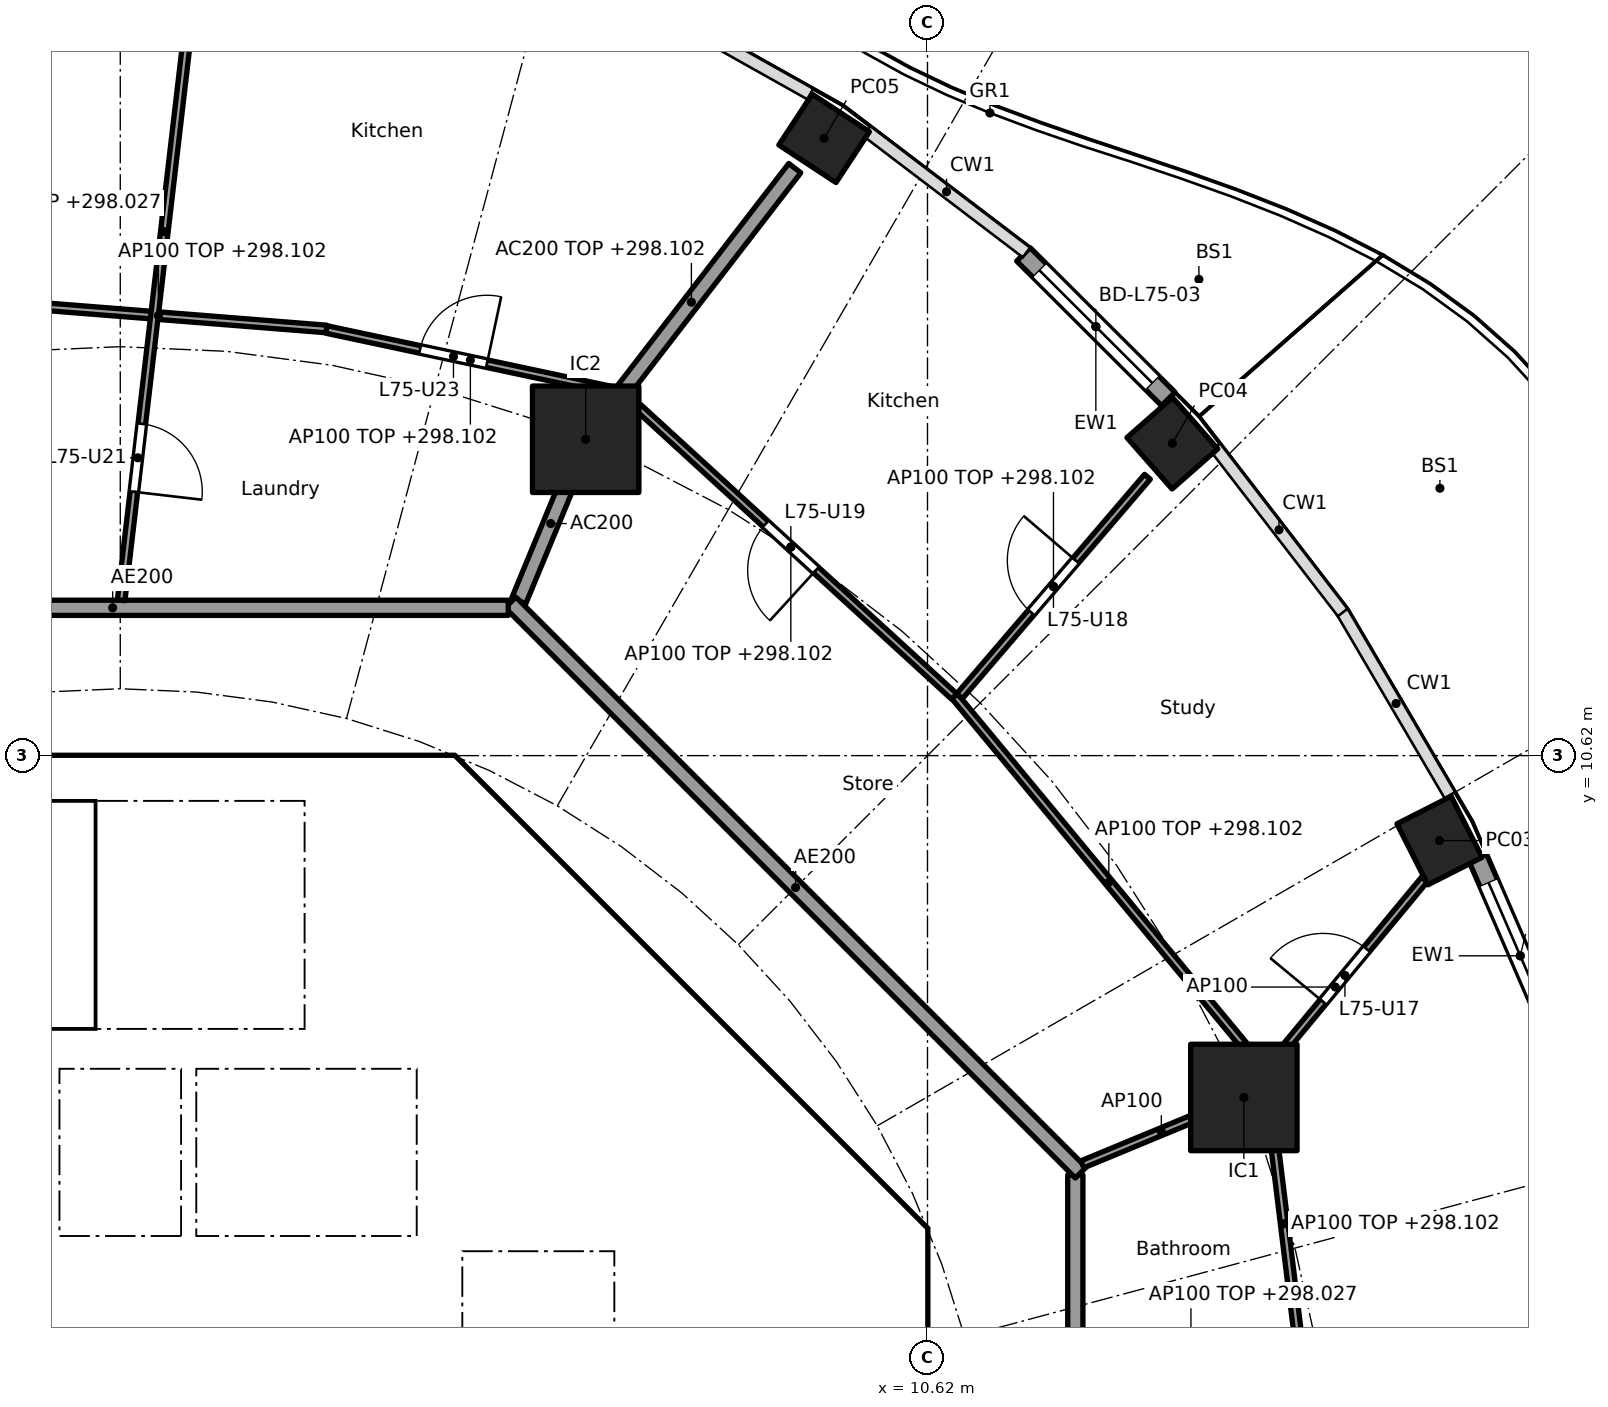
"""IFC4 building model, lengths in metres.
Left out: names, types, materials, properties, quantities, classifications, styles, units other than length and angle.
Written with IfcOpenShell. Run it as: python <this file> out.ifc"""

import sys

from ifc_helpers import new_model, si_unit, direction, frame, frame_2d, origin, origin_2d, place, context, subcontext, project, spatial, polyline, rectangle, hollow_rectangle, outline, extrude, element, fill, save


model = new_model("IFC4")
c1 = context("Model", 3, precision=1e-05, world=origin(), true_north=direction((0.0, 1.0)))
c2 = subcontext(c1, "Body", "Model", "MODEL_VIEW")
j1 = project(units=[si_unit("LENGTHUNIT", "METRE"), si_unit("PLANEANGLEUNIT", "RADIAN")], contexts=[c1])
p1 = place(None, origin())
s1 = spatial("IfcSite", under=j1, at=p1, CompositionType="ELEMENT")
p2 = place(p1, origin())
s2 = spatial("IfcBuilding", under=s1, at=p2, CompositionType="ELEMENT")
p3 = place(p2, frame((0.0, 0.0, 295.5)))
s3 = spatial("IfcBuildingStorey", under=s2, at=p3, CompositionType="ELEMENT", Elevation=295.5)
for number, where, z_axis, x_axis in (
    (1, (17.356, 9.502, 0.0), (0.0, 0.0, 1.0), (-0.452, 0.892, 0.0)),
    (2, (13.841, 14.73, 0.0), (0.0, 0.0, 1.0), (-0.66, 0.751, 0.0)),
    (3, (9.26, 18.741, 0.0), (0.0, 0.0, 1.0), (-0.836, 0.549, 0.0)),
):
    element("IfcColumn", number, at=place(p3, frame(where, z_axis=z_axis, x_axis=x_axis)), inside=s3, PredefinedType="COLUMN", context=c2, shape_type="SweptSolid", body=[
        extrude(hollow_rectangle(XDim=0.9, YDim=0.8, WallThickness=0.028, at=origin_2d()), origin(), (0.0, 0.0, 1.0), 3.7),
    ])
for number, where, z_axis, x_axis in (
    (4, (14.782, 6.123, 0.0), (0.0, 0.0, 1.0), (1.0, 0.0, 0.0)),
    (5, (6.123, 14.782, 0.0), (0.0, 0.0, 1.0), (1.0, 0.0, 0.0)),
):
    element("IfcColumn", number, at=place(p3, frame(where, z_axis=z_axis, x_axis=x_axis)), inside=s3, PredefinedType="COLUMN", context=c2, shape_type="SweptSolid", body=[
        extrude(rectangle(XDim=1.4, YDim=1.4, at=origin_2d()), origin(), (0.0, 0.0, 1.0), 3.7),
    ])
p4 = place(p3, frame((17.854, 9.29, 0.0), z_axis=(0.0, 0.0, 1.0), x_axis=(0.397597791596, -0.9175598052, 0.0)))
e6 = element("IfcWall", 6, at=p4, inside=s3, PredefinedType="SOLIDWALL", context=c2, shape_type="SweptSolid", body=[
    extrude(rectangle(XDim=2.841, YDim=0.25, at=frame_2d((1.42, 0.0))), origin(), (0.0, 0.0, 1.0), 3.28),
])
p5 = place(p4, frame((0.371, 0.0, 0.0)))
e7 = element("IfcOpeningElement", 7, at=p5, cuts=e6, PredefinedType="OPENING", context=c2, shape_type="SweptSolid", body=[
    extrude(rectangle(XDim=2.1, YDim=2.4, at=frame_2d((1.05, 1.2))), frame((0.0, 0.135, 0.0), z_axis=(0.0, -1.0, 0.0), x_axis=(1.0, 0.0, 0.0)), (0.0, 0.0, 1.0), 0.27),
])
p6 = place(p3, frame((11.882, 17.215, 0.0), z_axis=(0.0, 0.0, 1.0), x_axis=(0.707831739508, -0.706381078841, 0.0)))
e8 = element("IfcWall", 8, at=p6, inside=s3, PredefinedType="SOLIDWALL", context=c2, shape_type="SweptSolid", body=[
    extrude(rectangle(XDim=2.693, YDim=0.25, at=frame_2d((1.346, 0.0))), origin(), (0.0, 0.0, 1.0), 3.28),
])
p7 = place(p6, frame((0.296, 0.0, 0.0)))
e9 = element("IfcOpeningElement", 9, at=p7, cuts=e8, PredefinedType="OPENING", context=c2, shape_type="SweptSolid", body=[
    extrude(rectangle(XDim=2.1, YDim=2.4, at=frame_2d((1.05, 1.2))), frame((0.0, 0.135, 0.0), z_axis=(0.0, -1.0, 0.0), x_axis=(1.0, 0.0, 0.0)), (0.0, 0.0, 1.0), 0.27),
])
p8 = place(p3, frame((9.988, 4.613, 0.0), z_axis=(0.0, 0.0, 1.0), x_axis=(-0.707106781187, 0.707106781187, 0.0)))
e10 = element("IfcWall", 10, at=p8, inside=s3, PredefinedType="SHEAR", context=c2, shape_type="SweptSolid", body=[
    extrude(rectangle(XDim=7.602, YDim=0.6, at=frame_2d((3.801, 0.0))), origin(), (0.0, 0.0, 1.0), 3.28),
])
p9 = place(p8, frame((3.201, 0.0, 0.0)))
e11 = element("IfcOpeningElement", 11, at=p9, cuts=e10, PredefinedType="OPENING", context=c2, shape_type="SweptSolid", body=[
    extrude(rectangle(XDim=1.2, YDim=2.1, at=frame_2d((0.6, 1.05))), frame((0.0, 0.31, 0.0), z_axis=(0.0, -1.0, 0.0), x_axis=(1.0, 0.0, 0.0)), (0.0, 0.0, 1.0), 0.62),
])
p10 = place(p3, frame((4.0, 4.3, 0.0), z_axis=(0.0, 0.0, 1.0), x_axis=(0.0, 1.0, 0.0)))
e12 = element("IfcWall", 12, at=p10, inside=s3, PredefinedType="SOLIDWALL", context=c2, shape_type="SweptSolid", body=[
    extrude(rectangle(XDim=2.2, YDim=0.2, at=frame_2d((1.1, 0.0))), origin(), (0.0, 0.0, 1.0), 3.28),
])
p11 = place(p10, frame((0.55, 0.0, 0.0)))
e13 = element("IfcOpeningElement", 13, at=p11, cuts=e12, PredefinedType="OPENING", context=c2, shape_type="SweptSolid", body=[
    extrude(rectangle(XDim=1.1, YDim=2.1, at=frame_2d((0.55, 1.05))), frame((0.0, 0.11, 0.0), z_axis=(0.0, -1.0, 0.0), x_axis=(1.0, 0.0, 0.0)), (0.0, 0.0, 1.0), 0.22),
])
p12 = place(p3, frame((6.7, 4.0, 0.0), z_axis=(0.0, 0.0, 1.0), x_axis=(1.0, 0.0, 0.0)))
e14 = element("IfcWall", 14, at=p12, inside=s3, PredefinedType="SOLIDWALL", context=c2, shape_type="SweptSolid", body=[
    extrude(rectangle(XDim=3.325, YDim=0.2, at=frame_2d((1.662, 0.0))), origin(), (0.0, 0.0, 1.0), 3.28),
])
p13 = place(p12, frame((1.25, 0.0, 0.0)))
e15 = element("IfcOpeningElement", 15, at=p13, cuts=e14, PredefinedType="OPENING", context=c2, shape_type="SweptSolid", body=[
    extrude(rectangle(XDim=1.1, YDim=2.1, at=frame_2d((0.55, 1.05))), frame((0.0, 0.11, 0.0), z_axis=(0.0, -1.0, 0.0), x_axis=(1.0, 0.0, 0.0)), (0.0, 0.0, 1.0), 0.22),
])
p14 = place(p3, frame((4.0, 7.025, 0.0), z_axis=(0.0, 0.0, 1.0), x_axis=(0.0, 1.0, 0.0)))
e16 = element("IfcWall", 16, at=p14, inside=s3, PredefinedType="SOLIDWALL", context=c2, shape_type="SweptSolid", body=[
    extrude(rectangle(XDim=3.0, YDim=0.2, at=frame_2d((1.5, 0.0))), origin(), (0.0, 0.0, 1.0), 3.28),
])
p15 = place(p14, frame((0.925, 0.0, 0.0)))
e17 = element("IfcOpeningElement", 17, at=p15, cuts=e16, PredefinedType="OPENING", context=c2, shape_type="SweptSolid", body=[
    extrude(rectangle(XDim=1.1, YDim=2.1, at=frame_2d((0.55, 1.05))), frame((0.0, 0.11, 0.0), z_axis=(0.0, -1.0, 0.0), x_axis=(1.0, 0.0, 0.0)), (0.0, 0.0, 1.0), 0.22),
])
p16 = place(p3, origin())
e18 = element("IfcWall", 18, at=p16, inside=s3, PredefinedType="SHEAR", context=c2, shape_type="SweptSolid", body=[
    extrude(outline(polyline([(-4.152, 10.025), (-4.401, 9.776), (-4.825, 10.2), (-4.401, 10.625), (4.401, 10.625), (4.825, 10.2), (4.401, 9.776), (4.152, 10.025), (-4.152, 10.025)])), origin(), (0.0, 0.0, 1.0), 3.28),
])
p17 = place(p3, origin())
e19 = element("IfcWall", 19, at=p17, inside=s3, PredefinedType="SHEAR", context=c2, shape_type="SweptSolid", body=[
    extrude(outline(polyline([(9.776, -4.401), (10.025, -4.152), (10.025, -3.801), (10.025, 4.152), (9.776, 4.401), (10.2, 4.825), (10.625, 4.401), (10.625, -4.401), (10.2, -4.825), (9.776, -4.401)])), origin(), (0.0, 0.0, 1.0), 3.28),
])
for number, where, z_axis, x_axis in (
    (20, (-0.9, 4.3, 0.0), (0.0, 0.0, 1.0), (0.0, 1.0, 0.0)),
    (21, (0.9, 4.3, 0.0), (0.0, 0.0, 1.0), (0.0, 1.0, 0.0)),
):
    element("IfcWall", number, at=place(p3, frame(where, z_axis=z_axis, x_axis=x_axis)), inside=s3, PredefinedType="SOLIDWALL", context=c2, shape_type="SweptSolid", body=[
        extrude(rectangle(XDim=2.2, YDim=0.2, at=frame_2d((1.1, 0.0))), origin(), (0.0, 0.0, 1.0), 3.28),
    ])
p18 = place(p3, origin())
e22 = element("IfcWall", 22, at=p18, inside=s3, PredefinedType="SOLIDWALL", context=c2, shape_type="SweptSolid", body=[
    extrude(outline(polyline([(-6.7, 4.3), (6.7, 4.3), (6.7, 2.1), (6.5, 2.1), (6.5, 4.1), (4.5, 4.1), (4.5, 2.1), (4.3, 2.1), (4.3, 4.1), (0.1, 4.1), (0.1, 2.1), (-0.1, 2.1), (-0.1, 4.1), (-6.5, 4.1), (-6.5, 2.1), (-6.7, 2.1), (-6.7, 4.3)])), origin(), (0.0, 0.0, 1.0), 3.28),
])
p19 = place(p3, origin())
e23 = element("IfcWall", 23, at=p19, inside=s3, PredefinedType="SOLIDWALL", context=c2, shape_type="SweptSolid", body=[
    extrude(outline(polyline([(4.1, 6.5), (-4.1, 6.5), (-4.1, 7.025), (4.1, 7.025), (4.1, 6.5)])), origin(), (0.0, 0.0, 1.0), 3.28),
])
p20 = place(p3, origin())
e24 = element("IfcWall", 24, at=p20, inside=s3, PredefinedType="SOLIDWALL", context=c2, shape_type="SweptSolid", body=[
    extrude(outline(polyline([(7.025, -3.9), (6.7, -3.9), (6.7, 3.9), (7.025, 3.9), (7.025, -3.9)])), origin(), (0.0, 0.0, 1.0), 3.28),
])
p21 = place(p3, frame((5.243, 12.657, 0.0), z_axis=(0.0, 0.0, 1.0), x_axis=(0.382691608661, 0.923876145736, 0.0)))
e25 = element("IfcWall", 25, at=p21, inside=s3, PredefinedType="PARTITIONING", context=c2, shape_type="SweptSolid", body=[
    extrude(rectangle(XDim=2.2, YDim=0.2, at=frame_2d((1.1, 0.0))), origin(), (0.0, 0.0, 1.0), 3.28),
])
p22 = place(p3, frame((6.154, 14.822, 0.0), z_axis=(0.0, 0.0, 1.0), x_axis=(0.610687612043, 0.791871606068, 0.0)))
e26 = element("IfcWall", 26, at=p22, inside=s3, PredefinedType="PARTITIONING", context=c2, shape_type="SweptSolid", body=[
    extrude(rectangle(XDim=4.455, YDim=0.2, at=frame_2d((2.228, 0.0))), origin(), (0.0, 0.0, 1.0), 2.602),
])
p23 = place(p3, frame((12.565, -5.104, 0.0), z_axis=(0.0, 0.0, 1.0), x_axis=(0.0, 1.0, 0.0)))
e27 = element("IfcWall", 27, at=p23, inside=s3, PredefinedType="PARTITIONING", context=c2, shape_type="SweptSolid", body=[
    extrude(rectangle(XDim=10.209, YDim=0.2, at=frame_2d((5.104, 0.0))), origin(), (0.0, 0.0, 1.0), 3.28),
])
p24 = place(p23, frame((4.604, 0.0, 0.0)))
e28 = element("IfcOpeningElement", 28, at=p24, cuts=e27, PredefinedType="OPENING", context=c2, shape_type="SweptSolid", body=[
    extrude(rectangle(XDim=1.0, YDim=2.1, at=frame_2d((0.5, 1.05))), frame((0.0, 0.11, 0.0), z_axis=(0.0, -1.0, 0.0), x_axis=(1.0, 0.0, 0.0)), (0.0, 0.0, 1.0), 0.22),
])
p25 = place(p3, frame((12.635, 5.134, 0.0), z_axis=(0.0, 0.0, 1.0), x_axis=(-0.707106781187, 0.707106781187, 0.0)))
e29 = element("IfcWall", 29, at=p25, inside=s3, PredefinedType="PARTITIONING", context=c2, shape_type="SweptSolid", body=[
    extrude(rectangle(XDim=10.609, YDim=0.2, at=frame_2d((5.305, 0.0))), origin(), (0.0, 0.0, 1.0), 3.28),
])
p26 = place(p3, frame((5.104, 12.565, 0.0), z_axis=(0.0, 0.0, 1.0), x_axis=(-1.0, 0.0, 0.0)))
e30 = element("IfcWall", 30, at=p26, inside=s3, PredefinedType="PARTITIONING", context=c2, shape_type="SweptSolid", body=[
    extrude(rectangle(XDim=10.409, YDim=0.2, at=frame_2d((5.205, 0.0))), origin(), (0.0, 0.0, 1.0), 3.28),
])
p27 = place(p26, frame((6.339, 0.0, 0.0)))
e31 = element("IfcOpeningElement", 31, at=p27, cuts=e30, PredefinedType="OPENING", context=c2, shape_type="SweptSolid", body=[
    extrude(rectangle(XDim=1.0, YDim=2.1, at=frame_2d((0.5, 1.05))), frame((0.0, 0.11, 0.0), z_axis=(0.0, -1.0, 0.0), x_axis=(1.0, 0.0, 0.0)), (0.0, 0.0, 1.0), 0.22),
])
p28 = place(p3, frame((15.552, 2.508, 0.0), z_axis=(0.0, 0.0, 1.0), x_axis=(-0.12196631785, 0.992534239868, 0.0)))
e32 = element("IfcWall", 32, at=p28, inside=s3, PredefinedType="PARTITIONING", context=c2, shape_type="SweptSolid", body=[
    extrude(rectangle(XDim=3.937, YDim=0.1, at=frame_2d((1.969, 0.0))), origin(), (0.0, 0.0, 1.0), 2.602),
])
p29 = place(p3, frame((12.657, 5.243, 0.0), z_axis=(0.0, 0.0, 1.0), x_axis=(0.923864733477, 0.382719158442, 0.0)))
e33 = element("IfcWall", 33, at=p29, inside=s3, PredefinedType="PARTITIONING", context=c2, shape_type="SweptSolid", body=[
    extrude(rectangle(XDim=2.25, YDim=0.1, at=frame_2d((1.125, 0.0))), origin(), (0.0, 0.0, 1.0), 3.28),
])
p30 = place(p3, frame((14.814, 6.161, 0.0), z_axis=(0.0, 0.0, 1.0), x_axis=(0.638050520313, 0.769994502272, 0.0)))
e34 = element("IfcWall", 34, at=p30, inside=s3, PredefinedType="PARTITIONING", context=c2, shape_type="SweptSolid", body=[
    extrude(rectangle(XDim=3.673, YDim=0.1, at=frame_2d((1.836, 0.0))), origin(), (0.0, 0.0, 1.0), 3.28),
])
p31 = place(p30, frame((1.584, 0.0, 0.0)))
e35 = element("IfcOpeningElement", 35, at=p31, cuts=e34, PredefinedType="OPENING", context=c2, shape_type="SweptSolid", body=[
    extrude(rectangle(XDim=0.9, YDim=2.1, at=frame_2d((0.45, 1.05))), frame((0.0, 0.06, 0.0), z_axis=(0.0, -1.0, 0.0), x_axis=(1.0, 0.0, 0.0)), (0.0, 0.0, 1.0), 0.12),
])
p32 = place(p3, frame((15.034, 6.504, 0.0), z_axis=(0.0, 0.0, 1.0), x_axis=(-0.637935278767, 0.770089981823, 0.0)))
e36 = element("IfcWall", 36, at=p32, inside=s3, PredefinedType="PARTITIONING", context=c2, shape_type="SweptSolid", body=[
    extrude(rectangle(XDim=6.361, YDim=0.1, at=frame_2d((3.18, 0.0))), origin(), (0.0, 0.0, 1.0), 2.602),
])
p33 = place(p3, frame((11.041, 11.402, 0.0), z_axis=(0.0, 0.0, 1.0), x_axis=(0.650558544325, 0.759456108282, 0.0)))
e37 = element("IfcWall", 37, at=p33, inside=s3, PredefinedType="PARTITIONING", context=c2, shape_type="SweptSolid", body=[
    extrude(rectangle(XDim=3.8, YDim=0.1, at=frame_2d((1.9, 0.0))), origin(), (0.0, 0.0, 1.0), 2.602),
])
p34 = place(p33, frame((1.45, 0.0, 0.0)))
e38 = element("IfcOpeningElement", 38, at=p34, cuts=e37, PredefinedType="OPENING", context=c2, shape_type="SweptSolid", body=[
    extrude(rectangle(XDim=0.9, YDim=2.1, at=frame_2d((0.45, 1.05))), frame((0.0, 0.06, 0.0), z_axis=(0.0, -1.0, 0.0), x_axis=(1.0, 0.0, 0.0)), (0.0, 0.0, 1.0), 0.12),
])
p35 = place(p3, frame((10.972, 11.398, 0.0), z_axis=(0.0, 0.0, 1.0), x_axis=(-0.737830272434, 0.674986288069, 0.0)))
e39 = element("IfcWall", 39, at=p35, inside=s3, PredefinedType="PARTITIONING", context=c2, shape_type="SweptSolid", body=[
    extrude(rectangle(XDim=5.827, YDim=0.1, at=frame_2d((2.914, 0.0))), origin(), (0.0, 0.0, 1.0), 2.602),
])
p36 = place(p35, frame((2.464, 0.0, 0.0)))
e40 = element("IfcOpeningElement", 40, at=p36, cuts=e39, PredefinedType="OPENING", context=c2, shape_type="SweptSolid", body=[
    extrude(rectangle(XDim=0.9, YDim=2.1, at=frame_2d((0.45, 1.05))), frame((0.0, 0.06, 0.0), z_axis=(0.0, -1.0, 0.0), x_axis=(1.0, 0.0, 0.0)), (0.0, 0.0, 1.0), 0.12),
])
p37 = place(p3, frame((6.5, 15.419, 0.0), z_axis=(0.0, 0.0, 1.0), x_axis=(-0.978053492557, 0.208353943321, 0.0)))
e41 = element("IfcWall", 41, at=p37, inside=s3, PredefinedType="PARTITIONING", context=c2, shape_type="SweptSolid", body=[
    extrude(rectangle(XDim=3.874, YDim=0.1, at=frame_2d((1.937, 0.0))), origin(), (0.0, 0.0, 1.0), 2.602),
])
p38 = place(p37, frame((1.714, 0.0, 0.0)))
e42 = element("IfcOpeningElement", 42, at=p38, cuts=e41, PredefinedType="OPENING", context=c2, shape_type="SweptSolid", body=[
    extrude(rectangle(XDim=0.9, YDim=2.1, at=frame_2d((0.45, 1.05))), frame((0.0, 0.06, 0.0), z_axis=(0.0, -1.0, 0.0), x_axis=(1.0, 0.0, 0.0)), (0.0, 0.0, 1.0), 0.12),
])
p39 = place(p3, frame((2.713, 16.233, 0.0), z_axis=(0.0, 0.0, 1.0), x_axis=(-0.996870142942, 0.079056423588, 0.0)))
e43 = element("IfcWall", 43, at=p39, inside=s3, PredefinedType="PARTITIONING", context=c2, shape_type="SweptSolid", body=[
    extrude(rectangle(XDim=4.438, YDim=0.1, at=frame_2d((2.219, 0.0))), origin(), (0.0, 0.0, 1.0), 2.602),
])
p40 = place(p3, frame((0.012, 12.664, 0.0), z_axis=(0.0, 0.0, 1.0), x_axis=(0.11636251357, 0.993206808996, 0.0)))
e44 = element("IfcWall", 44, at=p40, inside=s3, PredefinedType="PARTITIONING", context=c2, shape_type="SweptSolid", body=[
    extrude(rectangle(XDim=9.765, YDim=0.1, at=frame_2d((4.882, 0.0))), origin(), (0.0, 0.0, 1.0), 2.527),
])
p41 = place(p40, frame((1.437, 0.0, 0.0)))
e45 = element("IfcOpeningElement", 45, at=p41, cuts=e44, PredefinedType="OPENING", context=c2, shape_type="SweptSolid", body=[
    extrude(rectangle(XDim=0.9, YDim=2.1, at=frame_2d((0.45, 1.05))), frame((0.0, 0.06, 0.0), z_axis=(0.0, -1.0, 0.0), x_axis=(1.0, 0.0, 0.0)), (0.0, 0.0, 1.0), 0.12),
])
p42 = place(p5, origin())
e46 = element("IfcDoor", 46, at=p42, inside=s3, OperationType="SLIDING_TO_LEFT", PredefinedType="DOOR", context=c2, shape_type="SweptSolid", body=[
    extrude(rectangle(XDim=2.1, YDim=2.4, at=frame_2d((1.05, 1.2))), frame((0.0, 0.025, 0.0), z_axis=(0.0, -1.0, 0.0), x_axis=(1.0, 0.0, 0.0)), (0.0, 0.0, 1.0), 0.05),
])
fill(e7, e46)
p43 = place(p7, origin())
e47 = element("IfcDoor", 47, at=p43, inside=s3, OperationType="SLIDING_TO_LEFT", PredefinedType="DOOR", context=c2, shape_type="SweptSolid", body=[
    extrude(rectangle(XDim=2.1, YDim=2.4, at=frame_2d((1.05, 1.2))), frame((0.0, 0.025, 0.0), z_axis=(0.0, -1.0, 0.0), x_axis=(1.0, 0.0, 0.0)), (0.0, 0.0, 1.0), 0.05),
])
fill(e9, e47)
p44 = place(p11, origin())
e48 = element("IfcDoor", 48, at=p44, inside=s3, OperationType="DOUBLE_DOOR_SLIDING", PredefinedType="DOOR", context=c2, shape_type="SweptSolid", body=[
    extrude(rectangle(XDim=1.1, YDim=2.1, at=frame_2d((0.55, 1.05))), frame((0.0, 0.025, 0.0), z_axis=(0.0, -1.0, 0.0), x_axis=(1.0, 0.0, 0.0)), (0.0, 0.0, 1.0), 0.05),
])
fill(e13, e48)
p45 = place(p13, frame((1.1, 0.0, 0.0), x_axis=(-1.0, 0.0, 0.0)))
e49 = element("IfcDoor", 49, at=p45, inside=s3, OperationType="SINGLE_SWING_LEFT", PredefinedType="DOOR", context=c2, shape_type="SweptSolid", body=[
    extrude(rectangle(XDim=1.1, YDim=2.1, at=frame_2d((0.55, 1.05))), frame((0.0, 0.025, 0.0), z_axis=(0.0, -1.0, 0.0), x_axis=(1.0, 0.0, 0.0)), (0.0, 0.0, 1.0), 0.05),
])
fill(e15, e49)
p46 = place(p15, origin())
e50 = element("IfcDoor", 50, at=p46, inside=s3, OperationType="SINGLE_SWING_RIGHT", PredefinedType="DOOR", context=c2, shape_type="SweptSolid", body=[
    extrude(rectangle(XDim=1.1, YDim=2.1, at=frame_2d((0.55, 1.05))), frame((0.0, 0.025, 0.0), z_axis=(0.0, -1.0, 0.0), x_axis=(1.0, 0.0, 0.0)), (0.0, 0.0, 1.0), 0.05),
])
fill(e17, e50)
p47 = place(p9, origin())
e51 = element("IfcDoor", 51, at=p47, inside=s3, OperationType="SINGLE_SWING_RIGHT", PredefinedType="DOOR", context=c2, shape_type="SweptSolid", body=[
    extrude(rectangle(XDim=1.2, YDim=2.1, at=frame_2d((0.6, 1.05))), frame((0.0, 0.025, 0.0), z_axis=(0.0, -1.0, 0.0), x_axis=(1.0, 0.0, 0.0)), (0.0, 0.0, 1.0), 0.05),
])
fill(e11, e51)
p48 = place(p31, origin())
e52 = element("IfcDoor", 52, at=p48, inside=s3, OperationType="SINGLE_SWING_LEFT", PredefinedType="DOOR", context=c2, shape_type="SweptSolid", body=[
    extrude(rectangle(XDim=0.9, YDim=2.1, at=frame_2d((0.45, 1.05))), frame((0.0, 0.025, 0.0), z_axis=(0.0, -1.0, 0.0), x_axis=(1.0, 0.0, 0.0)), (0.0, 0.0, 1.0), 0.05),
])
fill(e35, e52)
p49 = place(p34, origin())
e53 = element("IfcDoor", 53, at=p49, inside=s3, OperationType="SINGLE_SWING_RIGHT", PredefinedType="DOOR", context=c2, shape_type="SweptSolid", body=[
    extrude(rectangle(XDim=0.9, YDim=2.1, at=frame_2d((0.45, 1.05))), frame((0.0, 0.025, 0.0), z_axis=(0.0, -1.0, 0.0), x_axis=(1.0, 0.0, 0.0)), (0.0, 0.0, 1.0), 0.05),
])
fill(e38, e53)
p50 = place(p36, origin())
e54 = element("IfcDoor", 54, at=p50, inside=s3, OperationType="SINGLE_SWING_LEFT", PredefinedType="DOOR", context=c2, shape_type="SweptSolid", body=[
    extrude(rectangle(XDim=0.9, YDim=2.1, at=frame_2d((0.45, 1.05))), frame((0.0, 0.025, 0.0), z_axis=(0.0, -1.0, 0.0), x_axis=(1.0, 0.0, 0.0)), (0.0, 0.0, 1.0), 0.05),
])
fill(e40, e54)
p51 = place(p41, frame((0.9, 0.0, 0.0), x_axis=(-1.0, 0.0, 0.0)))
e55 = element("IfcDoor", 55, at=p51, inside=s3, OperationType="SINGLE_SWING_RIGHT", PredefinedType="DOOR", context=c2, shape_type="SweptSolid", body=[
    extrude(rectangle(XDim=0.9, YDim=2.1, at=frame_2d((0.45, 1.05))), frame((0.0, 0.025, 0.0), z_axis=(0.0, -1.0, 0.0), x_axis=(1.0, 0.0, 0.0)), (0.0, 0.0, 1.0), 0.05),
])
fill(e45, e55)
p52 = place(p38, frame((0.9, 0.0, 0.0), x_axis=(-1.0, 0.0, 0.0)))
e56 = element("IfcDoor", 56, at=p52, inside=s3, OperationType="SINGLE_SWING_RIGHT", PredefinedType="DOOR", context=c2, shape_type="SweptSolid", body=[
    extrude(rectangle(XDim=0.9, YDim=2.1, at=frame_2d((0.45, 1.05))), frame((0.0, 0.025, 0.0), z_axis=(0.0, -1.0, 0.0), x_axis=(1.0, 0.0, 0.0)), (0.0, 0.0, 1.0), 0.05),
])
fill(e42, e56)
save(model, sys.argv[1])
